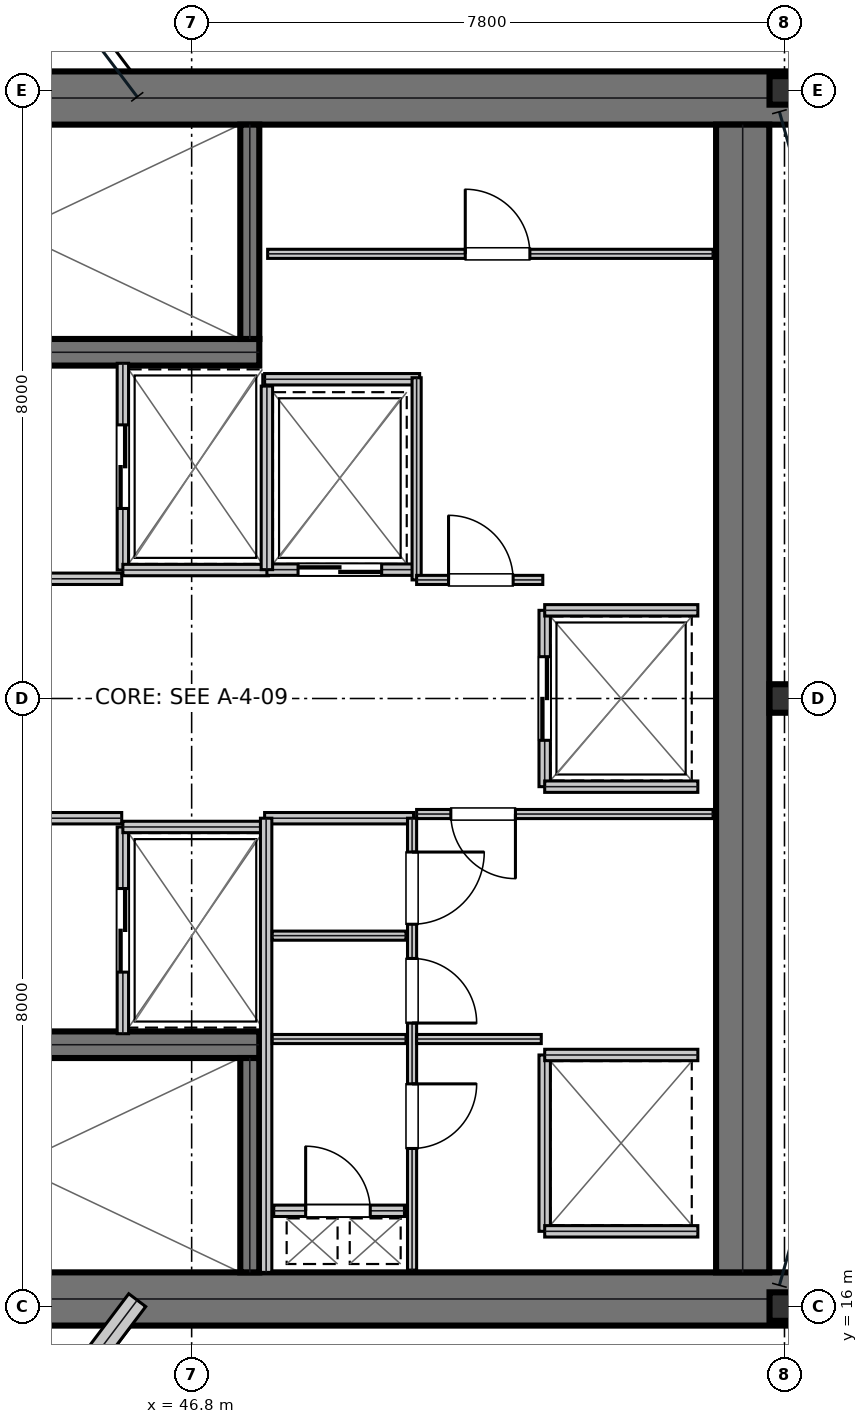
"""IFC4 building model, lengths in metres.
Left out: names, types, materials, properties, quantities, classifications, styles, units other than length and angle.
Written with IfcOpenShell. Run it as: python <this file> out.ifc"""

import sys

from ifc_helpers import new_model, si_unit, direction, frame, frame_2d, origin, origin_2d, place, context, subcontext, project, spatial, rectangle, i_section, extrude, element, fill, save


model = new_model("IFC4")
c1 = context("Model", 3, precision=1e-05, world=origin(), true_north=direction((0.0, 1.0)))
c2 = subcontext(c1, "Body", "Model", "MODEL_VIEW")
j1 = project(units=[si_unit("LENGTHUNIT", "METRE"), si_unit("PLANEANGLEUNIT", "RADIAN")], contexts=[c1])
p1 = place(None, origin())
s1 = spatial("IfcSite", under=j1, at=p1, CompositionType="ELEMENT")
p2 = place(p1, origin())
s2 = spatial("IfcBuilding", under=s1, at=p2, CompositionType="ELEMENT")
p3 = place(p2, frame((0.0, 0.0, 240.45)))
s3 = spatial("IfcBuildingStorey", under=s2, at=p3, CompositionType="ELEMENT", Elevation=240.45)
for number, where, z_axis, x_axis in (
    (1, (38.8, 31.9, 0.0), (0.0, 0.0, 1.0), (1.0, 0.0, 0.0)),
    (2, (38.8, 16.1, 0.0), (0.0, 0.0, 1.0), (1.0, 0.0, 0.0)),
):
    element("IfcWall", number, at=place(p3, frame(where, z_axis=z_axis, x_axis=x_axis)), inside=s3, PredefinedType="SHEAR", context=c2, shape_type="SweptSolid", body=[
        extrude(rectangle(XDim=16.0, YDim=0.7, at=frame_2d((8.0, 0.0))), origin(), (0.0, 0.0, 1.0), 3.79),
    ])
p4 = place(p3, frame((54.05, 16.45, 0.0), z_axis=(0.0, 0.0, 1.0), x_axis=(0.0, 1.0, 0.0)))
e3 = element("IfcWall", 3, at=p4, inside=s3, PredefinedType="SHEAR", context=c2, shape_type="SweptSolid", body=[
    extrude(rectangle(XDim=15.1, YDim=0.7, at=frame_2d((7.55, 0.0))), origin(), (0.0, 0.0, 1.0), 3.79),
])
p5 = place(p3, frame((39.98, 28.555, 0.0), z_axis=(0.0, 0.0, 1.0), x_axis=(1.0, 0.0, 0.0)))
e4 = element("IfcWall", 4, at=p5, inside=s3, PredefinedType="SHEAR", context=c2, shape_type="SweptSolid", body=[
    extrude(rectangle(XDim=7.71, YDim=0.35, at=frame_2d((3.855, 0.0))), origin(), (0.0, 0.0, 1.0), 3.79),
])
p6 = place(p5, frame((0.25, 0.0, 0.0)))
e5 = element("IfcOpeningElement", 5, at=p6, cuts=e4, PredefinedType="OPENING", context=c2, shape_type="SweptSolid", body=[
    extrude(rectangle(XDim=1.1, YDim=2.15, at=frame_2d((0.55, 1.075))), frame((0.0, 0.185, 0.0), z_axis=(0.0, -1.0, 0.0), x_axis=(1.0, 0.0, 0.0)), (0.0, 0.0, 1.0), 0.37),
])
p7 = place(p3, frame((39.98, 19.445, 0.0), z_axis=(0.0, 0.0, 1.0), x_axis=(1.0, 0.0, 0.0)))
e6 = element("IfcWall", 6, at=p7, inside=s3, PredefinedType="SHEAR", context=c2, shape_type="SweptSolid", body=[
    extrude(rectangle(XDim=7.71, YDim=0.35, at=frame_2d((3.855, 0.0))), origin(), (0.0, 0.0, 1.0), 3.79),
])
p8 = place(p7, frame((0.25, 0.0, 0.0)))
e7 = element("IfcOpeningElement", 7, at=p8, cuts=e6, PredefinedType="OPENING", context=c2, shape_type="SweptSolid", body=[
    extrude(rectangle(XDim=1.1, YDim=2.15, at=frame_2d((0.55, 1.075))), frame((0.0, 0.185, 0.0), z_axis=(0.0, -1.0, 0.0), x_axis=(1.0, 0.0, 0.0)), (0.0, 0.0, 1.0), 0.37),
])
for number, where, z_axis, x_axis in (
    (8, (47.565, 28.73, 0.0), (0.0, 0.0, 1.0), (0.0, 1.0, 0.0)),
    (9, (47.565, 16.45, 0.0), (0.0, 0.0, 1.0), (0.0, 1.0, 0.0)),
):
    element("IfcWall", number, at=place(p3, frame(where, z_axis=z_axis, x_axis=x_axis)), inside=s3, PredefinedType="SHEAR", context=c2, shape_type="SweptSolid", body=[
        extrude(rectangle(XDim=2.82, YDim=0.25, at=frame_2d((1.41, 0.0))), origin(), (0.0, 0.0, 1.0), 3.79),
    ])
for number, where, z_axis, x_axis in (
    (10, (54.6, 16.0, 0.0), (0.0, 0.0, 1.0), (1.0, 0.0, 0.0)),
    (11, (54.6, 24.0, 0.0), (0.0, 0.0, 1.0), (1.0, 0.0, 0.0)),
    (12, (54.6, 32.0, 0.0), (0.0, 0.0, 1.0), (1.0, 0.0, 0.0)),
):
    element("IfcColumn", number, at=place(p3, frame(where, z_axis=z_axis, x_axis=x_axis)), inside=s3, PredefinedType="COLUMN", context=c2, shape_type="SweptSolid", body=[
        extrude(i_section(OverallWidth=0.394, OverallDepth=0.375, WebThickness=0.017, FlangeThickness=0.028, at=origin_2d()), origin(), (0.0, 0.0, 1.0), 4.044),
    ])
p9 = place(p3, frame((43.961, 13.273, 0.0), z_axis=(0.0, 0.0, 1.0), x_axis=(0.602635996318, 0.7980162003, 0.0)))
e13 = element("IfcWall", 13, at=p9, inside=s3, PredefinedType="STANDARD", context=c2, shape_type="SweptSolid", body=[
    extrude(rectangle(XDim=3.522, YDim=0.28, at=frame_2d((1.761, 0.0))), origin(), (0.0, 0.0, 1.0), 3.319),
])
p10 = place(p3, frame((39.98, 25.575, 0.0), z_axis=(0.0, 0.0, 1.0), x_axis=(1.0, 0.0, 0.0)))
e14 = element("IfcWall", 14, at=p10, inside=s3, PredefinedType="PARTITIONING", context=c2, shape_type="SweptSolid", body=[
    extrude(rectangle(XDim=5.9, YDim=0.15, at=frame_2d((2.95, 0.0))), origin(), (0.0, 0.0, 1.0), 3.79),
])
p11 = place(p10, frame((2.35, 0.0, 0.0)))
e15 = element("IfcOpeningElement", 15, at=p11, cuts=e14, PredefinedType="OPENING", context=c2, shape_type="SweptSolid", body=[
    extrude(rectangle(XDim=1.05, YDim=2.15, at=frame_2d((0.525, 1.075))), frame((0.0, 0.085, 0.0), z_axis=(0.0, -1.0, 0.0), x_axis=(1.0, 0.0, 0.0)), (0.0, 0.0, 1.0), 0.17),
])
p12 = place(p3, frame((39.98, 22.425, 0.0), z_axis=(0.0, 0.0, 1.0), x_axis=(1.0, 0.0, 0.0)))
e16 = element("IfcWall", 16, at=p12, inside=s3, PredefinedType="PARTITIONING", context=c2, shape_type="SweptSolid", body=[
    extrude(rectangle(XDim=5.9, YDim=0.15, at=frame_2d((2.95, 0.0))), origin(), (0.0, 0.0, 1.0), 3.79),
])
p13 = place(p12, frame((2.35, 0.0, 0.0)))
e17 = element("IfcOpeningElement", 17, at=p13, cuts=e16, PredefinedType="OPENING", context=c2, shape_type="SweptSolid", body=[
    extrude(rectangle(XDim=1.05, YDim=2.15, at=frame_2d((0.525, 1.075))), frame((0.0, 0.085, 0.0), z_axis=(0.0, -1.0, 0.0), x_axis=(1.0, 0.0, 0.0)), (0.0, 0.0, 1.0), 0.17),
])
p14 = place(p3, frame((45.895, 25.69, 0.0), z_axis=(0.0, 0.0, 1.0), x_axis=(0.0, 1.0, 0.0)))
e18 = element("IfcWall", 18, at=p14, inside=s3, PredefinedType="PARTITIONING", context=c2, shape_type="SweptSolid", body=[
    extrude(rectangle(XDim=2.72, YDim=0.15, at=frame_2d((1.36, 0.0))), origin(), (0.0, 0.0, 1.0), 3.79),
])
p15 = place(p14, frame((0.81, 0.0, 0.0)))
e19 = element("IfcOpeningElement", 19, at=p15, cuts=e18, PredefinedType="OPENING", context=c2, shape_type="SweptSolid", body=[
    extrude(rectangle(XDim=1.1, YDim=2.15, at=frame_2d((0.55, 1.075))), frame((0.0, 0.085, 0.0), z_axis=(0.0, -1.0, 0.0), x_axis=(1.0, 0.0, 0.0)), (0.0, 0.0, 1.0), 0.17),
])
p16 = place(p3, frame((45.895, 25.69, 0.0), z_axis=(0.0, 0.0, 1.0), x_axis=(1.0, 0.0, 0.0)))
e20 = element("IfcWall", 20, at=p16, inside=s3, PredefinedType="PARTITIONING", context=c2, shape_type="SweptSolid", body=[
    extrude(rectangle(XDim=1.915, YDim=0.15, at=frame_2d((0.958, 0.0))), origin(), (0.0, 0.0, 1.0), 3.79),
])
p17 = place(p3, frame((45.895, 19.59, 0.0), z_axis=(0.0, 0.0, 1.0), x_axis=(0.0, 1.0, 0.0)))
e21 = element("IfcWall", 21, at=p17, inside=s3, PredefinedType="PARTITIONING", context=c2, shape_type="SweptSolid", body=[
    extrude(rectangle(XDim=2.72, YDim=0.15, at=frame_2d((1.36, 0.0))), origin(), (0.0, 0.0, 1.0), 3.79),
])
p18 = place(p17, frame((0.81, 0.0, 0.0)))
e22 = element("IfcOpeningElement", 22, at=p18, cuts=e21, PredefinedType="OPENING", context=c2, shape_type="SweptSolid", body=[
    extrude(rectangle(XDim=1.1, YDim=2.15, at=frame_2d((0.55, 1.075))), frame((0.0, 0.085, 0.0), z_axis=(0.0, -1.0, 0.0), x_axis=(1.0, 0.0, 0.0)), (0.0, 0.0, 1.0), 0.17),
])
p19 = place(p3, frame((45.895, 22.31, 0.0), z_axis=(0.0, 0.0, 1.0), x_axis=(1.0, 0.0, 0.0)))
e23 = element("IfcWall", 23, at=p19, inside=s3, PredefinedType="PARTITIONING", context=c2, shape_type="SweptSolid", body=[
    extrude(rectangle(XDim=1.915, YDim=0.15, at=frame_2d((0.958, 0.0))), origin(), (0.0, 0.0, 1.0), 3.79),
])
p20 = place(p3, frame((47.79, 25.695, 0.0), z_axis=(0.0, 0.0, 1.0), x_axis=(1.0, 0.0, 0.0)))
e24 = element("IfcWall", 24, at=p20, inside=s3, PredefinedType="PARTITIONING", context=c2, shape_type="SweptSolid", body=[
    extrude(rectangle(XDim=1.92, YDim=0.15, at=frame_2d((0.96, 0.0))), origin(), (0.0, 0.0, 1.0), 3.79),
])
p21 = place(p20, frame((0.41, 0.0, 0.0)))
e25 = element("IfcOpeningElement", 25, at=p21, cuts=e24, PredefinedType="OPENING", context=c2, shape_type="SweptSolid", body=[
    extrude(rectangle(XDim=1.1, YDim=2.15, at=frame_2d((0.55, 1.075))), frame((0.0, 0.085, 0.0), z_axis=(0.0, -1.0, 0.0), x_axis=(1.0, 0.0, 0.0)), (0.0, 0.0, 1.0), 0.17),
])
p22 = place(p3, frame((47.79, 25.695, 0.0), z_axis=(0.0, 0.0, 1.0), x_axis=(0.0, 1.0, 0.0)))
e26 = element("IfcWall", 26, at=p22, inside=s3, PredefinedType="PARTITIONING", context=c2, shape_type="SweptSolid", body=[
    extrude(rectangle(XDim=2.415, YDim=0.15, at=frame_2d((1.208, 0.0))), origin(), (0.0, 0.0, 1.0), 3.79),
])
p23 = place(p3, frame((51.445, 22.84, 0.0), z_axis=(0.0, 0.0, 1.0), x_axis=(0.0, 1.0, 0.0)))
e27 = element("IfcWall", 27, at=p23, inside=s3, PredefinedType="PARTITIONING", context=c2, shape_type="SweptSolid", body=[
    extrude(rectangle(XDim=2.32, YDim=0.15, at=frame_2d((1.16, 0.0))), origin(), (0.0, 0.0, 1.0), 3.79),
])
p24 = place(p23, frame((0.61, 0.0, 0.0)))
e28 = element("IfcOpeningElement", 28, at=p24, cuts=e27, PredefinedType="OPENING", context=c2, shape_type="SweptSolid", body=[
    extrude(rectangle(XDim=1.1, YDim=2.15, at=frame_2d((0.55, 1.075))), frame((0.0, 0.085, 0.0), z_axis=(0.0, -1.0, 0.0), x_axis=(1.0, 0.0, 0.0)), (0.0, 0.0, 1.0), 0.17),
])
for number, where, z_axis, x_axis in (
    (29, (51.445, 22.84, 0.0), (0.0, 0.0, 1.0), (1.0, 0.0, 0.0)),
    (30, (51.445, 25.16, 0.0), (0.0, 0.0, 1.0), (1.0, 0.0, 0.0)),
):
    element("IfcWall", number, at=place(p3, frame(where, z_axis=z_axis, x_axis=x_axis)), inside=s3, PredefinedType="PARTITIONING", context=c2, shape_type="SweptSolid", body=[
        extrude(rectangle(XDim=2.015, YDim=0.15, at=frame_2d((1.007, 0.0))), origin(), (0.0, 0.0, 1.0), 3.79),
    ])
p25 = place(p3, frame((51.445, 16.99, 0.0), z_axis=(0.0, 0.0, 1.0), x_axis=(0.0, 1.0, 0.0)))
e31 = element("IfcWall", 31, at=p25, inside=s3, PredefinedType="PARTITIONING", context=c2, shape_type="SweptSolid", body=[
    extrude(rectangle(XDim=2.32, YDim=0.15, at=frame_2d((1.16, 0.0))), origin(), (0.0, 0.0, 1.0), 3.79),
])
for number, where, z_axis, x_axis in (
    (32, (51.445, 16.99, 0.0), (0.0, 0.0, 1.0), (1.0, 0.0, 0.0)),
    (33, (51.445, 19.31, 0.0), (0.0, 0.0, 1.0), (1.0, 0.0, 0.0)),
):
    element("IfcWall", number, at=place(p3, frame(where, z_axis=z_axis, x_axis=x_axis)), inside=s3, PredefinedType="PARTITIONING", context=c2, shape_type="SweptSolid", body=[
        extrude(rectangle(XDim=2.015, YDim=0.15, at=frame_2d((1.007, 0.0))), origin(), (0.0, 0.0, 1.0), 3.79),
    ])
p26 = place(p3, frame((47.88, 17.26, 0.0), z_axis=(0.0, 0.0, 1.0), x_axis=(1.0, 0.0, 0.0)))
e34 = element("IfcWall", 34, at=p26, inside=s3, PredefinedType="PARTITIONING", context=c2, shape_type="SweptSolid", body=[
    extrude(rectangle(XDim=1.72, YDim=0.15, at=frame_2d((0.86, 0.0))), origin(), (0.0, 0.0, 1.0), 3.79),
])
p27 = place(p26, frame((0.42, 0.0, 0.0)))
e35 = element("IfcOpeningElement", 35, at=p27, cuts=e34, PredefinedType="OPENING", context=c2, shape_type="SweptSolid", body=[
    extrude(rectangle(XDim=0.85, YDim=2.15, at=frame_2d((0.425, 1.075))), frame((0.0, 0.085, 0.0), z_axis=(0.0, -1.0, 0.0), x_axis=(1.0, 0.0, 0.0)), (0.0, 0.0, 1.0), 0.17),
])
p28 = place(p3, frame((47.76, 22.425, 0.0), z_axis=(0.0, 0.0, 1.0), x_axis=(1.0, 0.0, 0.0)))
e36 = element("IfcWall", 36, at=p28, inside=s3, PredefinedType="PARTITIONING", context=c2, shape_type="SweptSolid", body=[
    extrude(rectangle(XDim=1.96, YDim=0.15, at=frame_2d((0.98, 0.0))), origin(), (0.0, 0.0, 1.0), 3.79),
])
p29 = place(p3, frame((47.78, 16.45, 0.0), z_axis=(0.0, 0.0, 1.0), x_axis=(0.0, 1.0, 0.0)))
e37 = element("IfcWall", 37, at=p29, inside=s3, PredefinedType="PARTITIONING", context=c2, shape_type="SweptSolid", body=[
    extrude(rectangle(XDim=5.975, YDim=0.15, at=frame_2d((2.988, 0.0))), origin(), (0.0, 0.0, 1.0), 3.79),
])
for number, where, z_axis, x_axis in (
    (38, (47.86, 19.52, 0.0), (0.0, 0.0, 1.0), (1.0, 0.0, 0.0)),
    (39, (47.86, 20.88, 0.0), (0.0, 0.0, 1.0), (1.0, 0.0, 0.0)),
):
    element("IfcWall", number, at=place(p3, frame(where, z_axis=z_axis, x_axis=x_axis)), inside=s3, PredefinedType="PARTITIONING", context=c2, shape_type="SweptSolid", body=[
        extrude(rectangle(XDim=1.76, YDim=0.12, at=frame_2d((0.88, 0.0))), origin(), (0.0, 0.0, 1.0), 3.79),
    ])
p30 = place(p3, frame((49.7, 16.48, 0.0), z_axis=(0.0, 0.0, 1.0), x_axis=(0.0, 1.0, 0.0)))
e40 = element("IfcWall", 40, at=p30, inside=s3, PredefinedType="PARTITIONING", context=c2, shape_type="SweptSolid", body=[
    extrude(rectangle(XDim=5.945, YDim=0.12, at=frame_2d((2.973, 0.0))), origin(), (0.0, 0.0, 1.0), 3.79),
])
p31 = place(p30, frame((1.6, 0.0, 0.0)))
e41 = element("IfcOpeningElement", 41, at=p31, cuts=e40, PredefinedType="OPENING", context=c2, shape_type="SweptSolid", body=[
    extrude(rectangle(XDim=0.85, YDim=2.15, at=frame_2d((0.425, 1.075))), frame((0.0, 0.07, 0.0), z_axis=(0.0, -1.0, 0.0), x_axis=(1.0, 0.0, 0.0)), (0.0, 0.0, 1.0), 0.14),
])
p32 = place(p30, frame((3.25, 0.0, 0.0)))
e42 = element("IfcOpeningElement", 42, at=p32, cuts=e40, PredefinedType="OPENING", context=c2, shape_type="SweptSolid", body=[
    extrude(rectangle(XDim=0.85, YDim=2.15, at=frame_2d((0.425, 1.075))), frame((0.0, 0.07, 0.0), z_axis=(0.0, -1.0, 0.0), x_axis=(1.0, 0.0, 0.0)), (0.0, 0.0, 1.0), 0.14),
])
p33 = place(p30, frame((4.55, 0.0, 0.0)))
e43 = element("IfcOpeningElement", 43, at=p33, cuts=e40, PredefinedType="OPENING", context=c2, shape_type="SweptSolid", body=[
    extrude(rectangle(XDim=0.95, YDim=2.15, at=frame_2d((0.475, 1.075))), frame((0.0, 0.07, 0.0), z_axis=(0.0, -1.0, 0.0), x_axis=(1.0, 0.0, 0.0)), (0.0, 0.0, 1.0), 0.14),
])
p34 = place(p3, frame((49.76, 22.48, 0.0), z_axis=(0.0, 0.0, 1.0), x_axis=(1.0, 0.0, 0.0)))
e44 = element("IfcWall", 44, at=p34, inside=s3, PredefinedType="PARTITIONING", context=c2, shape_type="SweptSolid", body=[
    extrude(rectangle(XDim=3.9, YDim=0.12, at=frame_2d((1.95, 0.0))), origin(), (0.0, 0.0, 1.0), 3.79),
])
p35 = place(p34, frame((0.45, 0.0, 0.0)))
e45 = element("IfcOpeningElement", 45, at=p35, cuts=e44, PredefinedType="OPENING", context=c2, shape_type="SweptSolid", body=[
    extrude(rectangle(XDim=0.85, YDim=2.15, at=frame_2d((0.425, 1.075))), frame((0.0, 0.07, 0.0), z_axis=(0.0, -1.0, 0.0), x_axis=(1.0, 0.0, 0.0)), (0.0, 0.0, 1.0), 0.14),
])
p36 = place(p3, frame((49.76, 19.52, 0.0), z_axis=(0.0, 0.0, 1.0), x_axis=(1.0, 0.0, 0.0)))
e46 = element("IfcWall", 46, at=p36, inside=s3, PredefinedType="PARTITIONING", context=c2, shape_type="SweptSolid", body=[
    extrude(rectangle(XDim=1.64, YDim=0.12, at=frame_2d((0.82, 0.0))), origin(), (0.0, 0.0, 1.0), 3.79),
])
p37 = place(p3, frame((47.76, 28.2, 0.0), z_axis=(0.0, 0.0, 1.0), x_axis=(1.0, 0.0, 0.0)))
e47 = element("IfcWall", 47, at=p37, inside=s3, PredefinedType="PARTITIONING", context=c2, shape_type="SweptSolid", body=[
    extrude(rectangle(XDim=2.04, YDim=0.15, at=frame_2d((1.02, 0.0))), origin(), (0.0, 0.0, 1.0), 3.79),
])
p38 = place(p3, frame((49.76, 25.56, 0.0), z_axis=(0.0, 0.0, 1.0), x_axis=(0.0, 1.0, 0.0)))
e48 = element("IfcWall", 48, at=p38, inside=s3, PredefinedType="PARTITIONING", context=c2, shape_type="SweptSolid", body=[
    extrude(rectangle(XDim=2.66, YDim=0.12, at=frame_2d((1.33, 0.0))), origin(), (0.0, 0.0, 1.0), 3.79),
])
p39 = place(p3, frame((49.76, 25.56, 0.0), z_axis=(0.0, 0.0, 1.0), x_axis=(1.0, 0.0, 0.0)))
e49 = element("IfcWall", 49, at=p39, inside=s3, PredefinedType="PARTITIONING", context=c2, shape_type="SweptSolid", body=[
    extrude(rectangle(XDim=1.66, YDim=0.12, at=frame_2d((0.83, 0.0))), origin(), (0.0, 0.0, 1.0), 3.79),
])
p40 = place(p39, frame((0.42, 0.0, 0.0)))
e50 = element("IfcOpeningElement", 50, at=p40, cuts=e49, PredefinedType="OPENING", context=c2, shape_type="SweptSolid", body=[
    extrude(rectangle(XDim=0.85, YDim=2.15, at=frame_2d((0.425, 1.075))), frame((0.0, 0.07, 0.0), z_axis=(0.0, -1.0, 0.0), x_axis=(1.0, 0.0, 0.0)), (0.0, 0.0, 1.0), 0.14),
])
p41 = place(p3, frame((47.8, 29.85, 0.0), z_axis=(0.0, 0.0, 1.0), x_axis=(1.0, 0.0, 0.0)))
e51 = element("IfcWall", 51, at=p41, inside=s3, PredefinedType="PARTITIONING", context=c2, shape_type="SweptSolid", body=[
    extrude(rectangle(XDim=5.86, YDim=0.12, at=frame_2d((2.93, 0.0))), origin(), (0.0, 0.0, 1.0), 3.79),
])
p42 = place(p41, frame((2.6, 0.0, 0.0)))
e52 = element("IfcOpeningElement", 52, at=p42, cuts=e51, PredefinedType="OPENING", context=c2, shape_type="SweptSolid", body=[
    extrude(rectangle(XDim=0.85, YDim=2.15, at=frame_2d((0.425, 1.075))), frame((0.0, 0.07, 0.0), z_axis=(0.0, -1.0, 0.0), x_axis=(1.0, 0.0, 0.0)), (0.0, 0.0, 1.0), 0.14),
])
p43 = place(p15, frame((1.1, 0.0, 0.0), z_axis=(0.0, 0.0, 1.0), x_axis=(-1.0, 0.0, 0.0)))
e53 = element("IfcDoor", 53, at=p43, inside=s3, OperationType="DOUBLE_DOOR_SLIDING", PredefinedType="DOOR", context=c2, shape_type="SweptSolid", body=[
    extrude(rectangle(XDim=1.1, YDim=2.15, at=frame_2d((0.55, 1.075))), frame((0.0, 0.025, 0.0), z_axis=(0.0, -1.0, 0.0), x_axis=(1.0, 0.0, 0.0)), (0.0, 0.0, 1.0), 0.05),
])
fill(e19, e53)
p44 = place(p18, frame((1.1, 0.0, 0.0), z_axis=(0.0, 0.0, 1.0), x_axis=(-1.0, 0.0, 0.0)))
e54 = element("IfcDoor", 54, at=p44, inside=s3, OperationType="DOUBLE_DOOR_SLIDING", PredefinedType="DOOR", context=c2, shape_type="SweptSolid", body=[
    extrude(rectangle(XDim=1.1, YDim=2.15, at=frame_2d((0.55, 1.075))), frame((0.0, 0.025, 0.0), z_axis=(0.0, -1.0, 0.0), x_axis=(1.0, 0.0, 0.0)), (0.0, 0.0, 1.0), 0.05),
])
fill(e22, e54)
p45 = place(p21, frame((1.1, 0.0, 0.0), z_axis=(0.0, 0.0, 1.0), x_axis=(-1.0, 0.0, 0.0)))
e55 = element("IfcDoor", 55, at=p45, inside=s3, OperationType="DOUBLE_DOOR_SLIDING", PredefinedType="DOOR", context=c2, shape_type="SweptSolid", body=[
    extrude(rectangle(XDim=1.1, YDim=2.15, at=frame_2d((0.55, 1.075))), frame((0.0, 0.025, 0.0), z_axis=(0.0, -1.0, 0.0), x_axis=(1.0, 0.0, 0.0)), (0.0, 0.0, 1.0), 0.05),
])
fill(e25, e55)
p46 = place(p24, frame((1.1, 0.0, 0.0), z_axis=(0.0, 0.0, 1.0), x_axis=(-1.0, 0.0, 0.0)))
e56 = element("IfcDoor", 56, at=p46, inside=s3, OperationType="DOUBLE_DOOR_SLIDING", PredefinedType="DOOR", context=c2, shape_type="SweptSolid", body=[
    extrude(rectangle(XDim=1.1, YDim=2.15, at=frame_2d((0.55, 1.075))), frame((0.0, 0.025, 0.0), z_axis=(0.0, -1.0, 0.0), x_axis=(1.0, 0.0, 0.0)), (0.0, 0.0, 1.0), 0.05),
])
fill(e28, e56)
p47 = place(p27, origin())
e57 = element("IfcDoor", 57, at=p47, inside=s3, OperationType="SINGLE_SWING_LEFT", PredefinedType="TRAPDOOR", context=c2, shape_type="SweptSolid", body=[
    extrude(rectangle(XDim=0.85, YDim=2.15, at=frame_2d((0.425, 1.075))), frame((0.0, 0.025, 0.0), z_axis=(0.0, -1.0, 0.0), x_axis=(1.0, 0.0, 0.0)), (0.0, 0.0, 1.0), 0.05),
])
fill(e35, e57)
p48 = place(p31, frame((0.85, 0.0, 0.0), z_axis=(0.0, 0.0, 1.0), x_axis=(-1.0, 0.0, 0.0)))
e58 = element("IfcDoor", 58, at=p48, inside=s3, OperationType="SINGLE_SWING_LEFT", PredefinedType="DOOR", context=c2, shape_type="SweptSolid", body=[
    extrude(rectangle(XDim=0.85, YDim=2.15, at=frame_2d((0.425, 1.075))), frame((0.0, 0.025, 0.0), z_axis=(0.0, -1.0, 0.0), x_axis=(1.0, 0.0, 0.0)), (0.0, 0.0, 1.0), 0.05),
])
fill(e41, e58)
p49 = place(p32, frame((0.85, 0.0, 0.0), z_axis=(0.0, 0.0, 1.0), x_axis=(-1.0, 0.0, 0.0)))
e59 = element("IfcDoor", 59, at=p49, inside=s3, OperationType="SINGLE_SWING_RIGHT", PredefinedType="DOOR", context=c2, shape_type="SweptSolid", body=[
    extrude(rectangle(XDim=0.85, YDim=2.15, at=frame_2d((0.425, 1.075))), frame((0.0, 0.025, 0.0), z_axis=(0.0, -1.0, 0.0), x_axis=(1.0, 0.0, 0.0)), (0.0, 0.0, 1.0), 0.05),
])
fill(e42, e59)
p50 = place(p33, frame((0.95, 0.0, 0.0), z_axis=(0.0, 0.0, 1.0), x_axis=(-1.0, 0.0, 0.0)))
e60 = element("IfcDoor", 60, at=p50, inside=s3, OperationType="SINGLE_SWING_LEFT", PredefinedType="DOOR", context=c2, shape_type="SweptSolid", body=[
    extrude(rectangle(XDim=0.95, YDim=2.15, at=frame_2d((0.475, 1.075))), frame((0.0, 0.025, 0.0), z_axis=(0.0, -1.0, 0.0), x_axis=(1.0, 0.0, 0.0)), (0.0, 0.0, 1.0), 0.05),
])
fill(e43, e60)
p51 = place(p35, frame((0.85, 0.0, 0.0), z_axis=(0.0, 0.0, 1.0), x_axis=(-1.0, 0.0, 0.0)))
e61 = element("IfcDoor", 61, at=p51, inside=s3, OperationType="SINGLE_SWING_LEFT", PredefinedType="DOOR", context=c2, shape_type="SweptSolid", body=[
    extrude(rectangle(XDim=0.85, YDim=2.15, at=frame_2d((0.425, 1.075))), frame((0.0, 0.025, 0.0), z_axis=(0.0, -1.0, 0.0), x_axis=(1.0, 0.0, 0.0)), (0.0, 0.0, 1.0), 0.05),
])
fill(e45, e61)
p52 = place(p40, origin())
e62 = element("IfcDoor", 62, at=p52, inside=s3, OperationType="SINGLE_SWING_LEFT", PredefinedType="DOOR", context=c2, shape_type="SweptSolid", body=[
    extrude(rectangle(XDim=0.85, YDim=2.15, at=frame_2d((0.425, 1.075))), frame((0.0, 0.025, 0.0), z_axis=(0.0, -1.0, 0.0), x_axis=(1.0, 0.0, 0.0)), (0.0, 0.0, 1.0), 0.05),
])
fill(e50, e62)
p53 = place(p42, origin())
e63 = element("IfcDoor", 63, at=p53, inside=s3, OperationType="SINGLE_SWING_LEFT", PredefinedType="DOOR", context=c2, shape_type="SweptSolid", body=[
    extrude(rectangle(XDim=0.85, YDim=2.15, at=frame_2d((0.425, 1.075))), frame((0.0, 0.025, 0.0), z_axis=(0.0, -1.0, 0.0), x_axis=(1.0, 0.0, 0.0)), (0.0, 0.0, 1.0), 0.05),
])
fill(e52, e63)
save(model, sys.argv[1])
